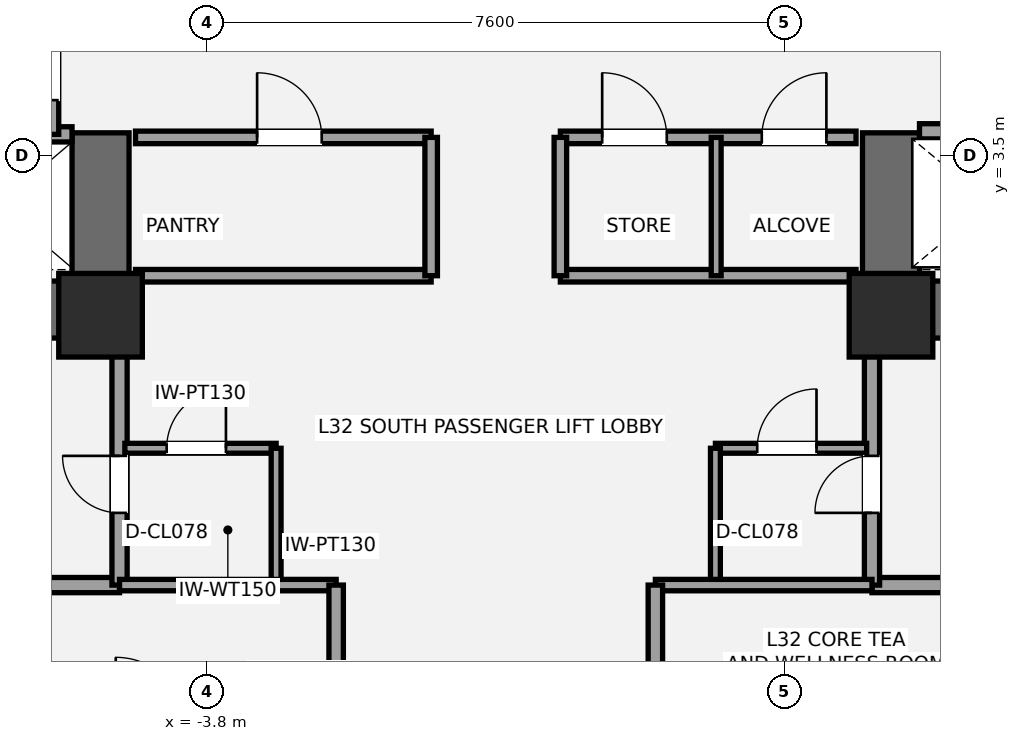
"""IFC4 building model, lengths in metres.
Left out: names, types, materials, properties, quantities, classifications, styles, units other than length and angle.
Written with IfcOpenShell. Run it as: python <this file> out.ifc"""

import sys

from ifc_helpers import new_model, si_unit, direction, frame, frame_2d, origin, origin_2d, place, context, subcontext, project, spatial, rectangle, extrude, element, fill, save


model = new_model("IFC4")
c1 = context("Model", 3, precision=1e-05, world=origin(), true_north=direction((0.0, 1.0)))
c2 = subcontext(c1, "Body", "Model", "MODEL_VIEW")
j1 = project(units=[si_unit("LENGTHUNIT", "METRE"), si_unit("PLANEANGLEUNIT", "RADIAN")], contexts=[c1])
p1 = place(None, origin())
s1 = spatial("IfcSite", under=j1, at=p1, CompositionType="ELEMENT")
p2 = place(p1, origin())
s2 = spatial("IfcBuilding", under=s1, at=p2, CompositionType="ELEMENT")
p3 = place(p2, frame((0.0, 0.0, 121.1)))
s3 = spatial("IfcBuildingStorey", under=s2, at=p3, CompositionType="ELEMENT", Elevation=121.1)
p4 = place(p3, frame((-4.825, 1.475, 0.0), z_axis=(0.0, 0.0, 1.0), x_axis=(-1.0, 0.0, 0.0)))
e1 = element("IfcWall", 1, at=p4, inside=s3, PredefinedType="SHEAR", context=c2, shape_type="SweptSolid", body=[
    extrude(rectangle(XDim=9.075, YDim=0.75, at=frame_2d((4.538, 0.0))), origin(), (0.0, 0.0, 1.0), 3.5),
])
p5 = place(p4, frame((5.475, 0.0, 0.0)))
e2 = element("IfcOpeningElement", 2, at=p5, cuts=e1, PredefinedType="OPENING", context=c2, shape_type="SweptSolid", body=[
    extrude(rectangle(XDim=1.05, YDim=2.15, at=frame_2d((0.525, 1.075))), frame((0.0, 0.385, 0.0), z_axis=(0.0, -1.0, 0.0), x_axis=(1.0, 0.0, 0.0)), (0.0, 0.0, 1.0), 0.77),
])
p6 = place(p4, frame((3.805, 0.0, 0.0)))
e3 = element("IfcOpeningElement", 3, at=p6, cuts=e1, PredefinedType="OPENING", context=c2, shape_type="SweptSolid", body=[
    extrude(rectangle(XDim=1.1, YDim=2.2, at=frame_2d((0.55, 1.1))), frame((0.0, 0.385, 0.0), z_axis=(0.0, -1.0, 0.0), x_axis=(1.0, 0.0, 0.0)), (0.0, 0.0, 1.0), 0.77),
])
p7 = place(p3, frame((-5.2, 1.1, 0.0), z_axis=(0.0, 0.0, 1.0), x_axis=(0.0, 1.0, 0.0)))
e4 = element("IfcWall", 4, at=p7, inside=s3, PredefinedType="SHEAR", context=c2, shape_type="SweptSolid", body=[
    extrude(rectangle(XDim=2.7, YDim=0.75, at=frame_2d((1.35, 0.0))), origin(), (0.0, 0.0, 1.0), 3.5),
])
p8 = place(p3, frame((13.9, 1.475, 0.0), z_axis=(0.0, 0.0, 1.0), x_axis=(-1.0, 0.0, 0.0)))
e5 = element("IfcWall", 5, at=p8, inside=s3, PredefinedType="SHEAR", context=c2, shape_type="SweptSolid", body=[
    extrude(rectangle(XDim=9.075, YDim=0.75, at=frame_2d((4.538, 0.0))), origin(), (0.0, 0.0, 1.0), 3.5),
])
p9 = place(p8, frame((2.55, 0.0, 0.0)))
e6 = element("IfcOpeningElement", 6, at=p9, cuts=e5, PredefinedType="OPENING", context=c2, shape_type="SweptSolid", body=[
    extrude(rectangle(XDim=1.05, YDim=2.15, at=frame_2d((0.525, 1.075))), frame((0.0, 0.385, 0.0), z_axis=(0.0, -1.0, 0.0), x_axis=(1.0, 0.0, 0.0)), (0.0, 0.0, 1.0), 0.77),
])
p10 = place(p8, frame((4.55, 0.0, 0.0)))
e7 = element("IfcOpeningElement", 7, at=p10, cuts=e5, PredefinedType="OPENING", context=c2, shape_type="SweptSolid", body=[
    extrude(rectangle(XDim=1.1, YDim=2.2, at=frame_2d((0.55, 1.1))), frame((0.0, 0.385, 0.0), z_axis=(0.0, -1.0, 0.0), x_axis=(1.0, 0.0, 0.0)), (0.0, 0.0, 1.0), 0.77),
])
p11 = place(p3, frame((5.2, 1.1, 0.0), z_axis=(0.0, 0.0, 1.0), x_axis=(0.0, 1.0, 0.0)))
e8 = element("IfcWall", 8, at=p11, inside=s3, PredefinedType="SHEAR", context=c2, shape_type="SweptSolid", body=[
    extrude(rectangle(XDim=2.7, YDim=0.75, at=frame_2d((1.35, 0.0))), origin(), (0.0, 0.0, 1.0), 3.5),
])
for number, where, z_axis, x_axis in (
    (9, (-5.2, 1.4, 0.0), (0.0, 0.0, 1.0), (1.0, 0.0, 0.0)),
    (10, (5.2, 1.4, 0.0), (0.0, 0.0, 1.0), (1.0, 0.0, 0.0)),
):
    element("IfcColumn", number, at=place(p3, frame(where, z_axis=z_axis, x_axis=x_axis)), inside=s3, PredefinedType="COLUMN", context=c2, shape_type="SweptSolid", body=[
        extrude(rectangle(XDim=1.1, YDim=1.1, at=origin_2d()), origin(), (0.0, 0.0, 1.0), 3.5),
    ])
p12 = place(p3, frame((-7.2, -2.15, 0.0), z_axis=(0.0, 0.0, 1.0), x_axis=(1.0, 0.0, 0.0)))
e11 = element("IfcWall", 11, at=p12, inside=s3, PredefinedType="SOLIDWALL", context=c2, shape_type="SweptSolid", body=[
    extrude(rectangle(XDim=2.25, YDim=0.2, at=frame_2d((1.125, 0.0))), origin(), (0.0, 0.0, 1.0), 2.763),
])
p13 = place(p3, frame((-4.95, -2.15, 0.0), z_axis=(0.0, 0.0, 1.0), x_axis=(0.0, 1.0, 0.0)))
e12 = element("IfcWall", 12, at=p13, inside=s3, PredefinedType="SOLIDWALL", context=c2, shape_type="SweptSolid", body=[
    extrude(rectangle(XDim=3.3, YDim=0.2, at=frame_2d((1.65, 0.0))), origin(), (0.0, 0.0, 1.0), 2.763),
])
p14 = place(p13, frame((0.95, 0.0, 0.0)))
e13 = element("IfcOpeningElement", 13, at=p14, cuts=e12, PredefinedType="OPENING", context=c2, shape_type="SweptSolid", body=[
    extrude(rectangle(XDim=0.75, YDim=2.1, at=frame_2d((0.375, 1.05))), frame((0.0, 0.11, 0.0), z_axis=(0.0, -1.0, 0.0), x_axis=(1.0, 0.0, 0.0)), (0.0, 0.0, 1.0), 0.22),
])
p15 = place(p3, frame((4.95, -2.15, 0.0), z_axis=(0.0, 0.0, 1.0), x_axis=(1.0, 0.0, 0.0)))
e14 = element("IfcWall", 14, at=p15, inside=s3, PredefinedType="SOLIDWALL", context=c2, shape_type="SweptSolid", body=[
    extrude(rectangle(XDim=2.25, YDim=0.2, at=frame_2d((1.125, 0.0))), origin(), (0.0, 0.0, 1.0), 3.31),
])
p16 = place(p3, frame((4.95, -2.15, 0.0), z_axis=(0.0, 0.0, 1.0), x_axis=(0.0, 1.0, 0.0)))
e15 = element("IfcWall", 15, at=p16, inside=s3, PredefinedType="SOLIDWALL", context=c2, shape_type="SweptSolid", body=[
    extrude(rectangle(XDim=3.3, YDim=0.2, at=frame_2d((1.65, 0.0))), origin(), (0.0, 0.0, 1.0), 2.763),
])
p17 = place(p16, frame((0.95, 0.0, 0.0)))
e16 = element("IfcOpeningElement", 16, at=p17, cuts=e15, PredefinedType="OPENING", context=c2, shape_type="SweptSolid", body=[
    extrude(rectangle(XDim=0.75, YDim=2.1, at=frame_2d((0.375, 1.05))), frame((0.0, 0.11, 0.0), z_axis=(0.0, -1.0, 0.0), x_axis=(1.0, 0.0, 0.0)), (0.0, 0.0, 1.0), 0.22),
])
p18 = place(p3, frame((-4.88, -0.35, 0.0), z_axis=(0.0, 0.0, 1.0), x_axis=(1.0, 0.0, 0.0)))
e17 = element("IfcWall", 17, at=p18, inside=s3, PredefinedType="PARTITIONING", context=c2, shape_type="SweptSolid", body=[
    extrude(rectangle(XDim=1.99, YDim=0.13, at=frame_2d((0.995, 0.0))), origin(), (0.0, 0.0, 1.0), 3.31),
])
p19 = place(p18, frame((0.55, 0.0, 0.0)))
e18 = element("IfcOpeningElement", 18, at=p19, cuts=e17, PredefinedType="OPENING", context=c2, shape_type="SweptSolid", body=[
    extrude(rectangle(XDim=0.78, YDim=2.1, at=frame_2d((0.39, 1.05))), frame((0.0, 0.075, 0.0), z_axis=(0.0, -1.0, 0.0), x_axis=(1.0, 0.0, 0.0)), (0.0, 0.0, 1.0), 0.15),
])
p20 = place(p3, frame((-2.89, -2.15, 0.0), z_axis=(0.0, 0.0, 1.0), x_axis=(0.0, 1.0, 0.0)))
e19 = element("IfcWall", 19, at=p20, inside=s3, PredefinedType="PARTITIONING", context=c2, shape_type="SweptSolid", body=[
    extrude(rectangle(XDim=1.8, YDim=0.13, at=frame_2d((0.9, 0.0))), origin(), (0.0, 0.0, 1.0), 2.763),
])
p21 = place(p3, frame((2.89, -0.35, 0.0), z_axis=(0.0, 0.0, 1.0), x_axis=(1.0, 0.0, 0.0)))
e20 = element("IfcWall", 20, at=p21, inside=s3, PredefinedType="PARTITIONING", context=c2, shape_type="SweptSolid", body=[
    extrude(rectangle(XDim=1.99, YDim=0.13, at=frame_2d((0.995, 0.0))), origin(), (0.0, 0.0, 1.0), 3.31),
])
p22 = place(p21, frame((0.55, 0.0, 0.0)))
e21 = element("IfcOpeningElement", 21, at=p22, cuts=e20, PredefinedType="OPENING", context=c2, shape_type="SweptSolid", body=[
    extrude(rectangle(XDim=0.78, YDim=2.1, at=frame_2d((0.39, 1.05))), frame((0.0, 0.075, 0.0), z_axis=(0.0, -1.0, 0.0), x_axis=(1.0, 0.0, 0.0)), (0.0, 0.0, 1.0), 0.15),
])
p23 = place(p3, frame((2.89, -2.15, 0.0), z_axis=(0.0, 0.0, 1.0), x_axis=(0.0, 1.0, 0.0)))
e22 = element("IfcWall", 22, at=p23, inside=s3, PredefinedType="PARTITIONING", context=c2, shape_type="SweptSolid", body=[
    extrude(rectangle(XDim=1.8, YDim=0.13, at=frame_2d((0.9, 0.0))), origin(), (0.0, 0.0, 1.0), 3.31),
])
p24 = place(p3, frame((-9.78, 3.78, 0.0), z_axis=(0.0, 0.0, 1.0), x_axis=(1.0, 0.0, 0.0)))
e23 = element("IfcWall", 23, at=p24, inside=s3, PredefinedType="SOLIDWALL", context=c2, shape_type="SweptSolid", body=[
    extrude(rectangle(XDim=4.205, YDim=0.2, at=frame_2d((2.103, 0.0))), origin(), (0.0, 0.0, 1.0), 3.31),
])
p25 = place(p3, frame((-5.85, 3.78, 0.0), z_axis=(0.0, 0.0, 1.0), x_axis=(0.0, 1.0, 0.0)))
e24 = element("IfcWall", 24, at=p25, inside=s3, PredefinedType="SOLIDWALL", context=c2, shape_type="SweptSolid", body=[
    extrude(rectangle(XDim=1.69, YDim=0.2, at=frame_2d((0.845, 0.0))), origin(), (0.0, 0.0, 1.0), 3.31),
])
p26 = place(p25, frame((0.45, 0.0, 0.0)))
e25 = element("IfcOpeningElement", 25, at=p26, cuts=e24, PredefinedType="OPENING", context=c2, shape_type="SweptSolid", body=[
    extrude(rectangle(XDim=0.75, YDim=2.1, at=frame_2d((0.375, 1.05))), frame((0.0, 0.11, 0.0), z_axis=(0.0, -1.0, 0.0), x_axis=(1.0, 0.0, 0.0)), (0.0, 0.0, 1.0), 0.22),
])
p27 = place(p3, frame((5.575, 3.82, 0.0), z_axis=(0.0, 0.0, 1.0), x_axis=(1.0, 0.0, 0.0)))
e26 = element("IfcWall", 26, at=p27, inside=s3, PredefinedType="SOLIDWALL", context=c2, shape_type="SweptSolid", body=[
    extrude(rectangle(XDim=4.205, YDim=0.2, at=frame_2d((2.103, 0.0))), origin(), (0.0, 0.0, 1.0), 3.31),
])
p28 = place(p27, frame((0.65, 0.0, 0.0)))
e27 = element("IfcOpeningElement", 27, at=p28, cuts=e26, PredefinedType="OPENING", context=c2, shape_type="SweptSolid", body=[
    extrude(rectangle(XDim=1.2, YDim=2.2, at=frame_2d((0.6, 1.1))), frame((0.0, 0.11, 0.0), z_axis=(0.0, -1.0, 0.0), x_axis=(1.0, 0.0, 0.0)), (0.0, 0.0, 1.0), 0.22),
])
p29 = place(p3, frame((-4.74, 1.92, 0.0), z_axis=(0.0, 0.0, 1.0), x_axis=(1.0, 0.0, 0.0)))
e28 = element("IfcWall", 28, at=p29, inside=s3, PredefinedType="PARTITIONING", context=c2, shape_type="SweptSolid", body=[
    extrude(rectangle(XDim=3.89, YDim=0.165, at=frame_2d((1.945, 0.0))), origin(), (0.0, 0.0, 1.0), 2.3),
])
p30 = place(p3, frame((-4.74, 3.74, 0.0), z_axis=(0.0, 0.0, 1.0), x_axis=(1.0, 0.0, 0.0)))
e29 = element("IfcWall", 29, at=p30, inside=s3, PredefinedType="PARTITIONING", context=c2, shape_type="SweptSolid", body=[
    extrude(rectangle(XDim=3.89, YDim=0.165, at=frame_2d((1.945, 0.0))), origin(), (0.0, 0.0, 1.0), 3.31),
])
p31 = place(p30, frame((1.6, 0.0, 0.0)))
e30 = element("IfcOpeningElement", 30, at=p31, cuts=e29, PredefinedType="OPENING", context=c2, shape_type="SweptSolid", body=[
    extrude(rectangle(XDim=0.85, YDim=2.1, at=frame_2d((0.425, 1.05))), frame((0.0, 0.093, 0.0), z_axis=(0.0, -1.0, 0.0), x_axis=(1.0, 0.0, 0.0)), (0.0, 0.0, 1.0), 0.185),
])
p32 = place(p3, frame((-0.85, 1.92, 0.0), z_axis=(0.0, 0.0, 1.0), x_axis=(0.0, 1.0, 0.0)))
e31 = element("IfcWall", 31, at=p32, inside=s3, PredefinedType="PARTITIONING", context=c2, shape_type="SweptSolid", body=[
    extrude(rectangle(XDim=1.82, YDim=0.165, at=frame_2d((0.91, 0.0))), origin(), (0.0, 0.0, 1.0), 3.31),
])
p33 = place(p3, frame((0.85, 1.92, 0.0), z_axis=(0.0, 0.0, 1.0), x_axis=(1.0, 0.0, 0.0)))
e32 = element("IfcWall", 32, at=p33, inside=s3, PredefinedType="PARTITIONING", context=c2, shape_type="SweptSolid", body=[
    extrude(rectangle(XDim=3.89, YDim=0.165, at=frame_2d((1.945, 0.0))), origin(), (0.0, 0.0, 1.0), 2.3),
])
p34 = place(p3, frame((0.85, 3.74, 0.0), z_axis=(0.0, 0.0, 1.0), x_axis=(1.0, 0.0, 0.0)))
e33 = element("IfcWall", 33, at=p34, inside=s3, PredefinedType="PARTITIONING", context=c2, shape_type="SweptSolid", body=[
    extrude(rectangle(XDim=3.89, YDim=0.165, at=frame_2d((1.945, 0.0))), origin(), (0.0, 0.0, 1.0), 3.31),
])
p35 = place(p34, frame((0.55, 0.0, 0.0)))
e34 = element("IfcOpeningElement", 34, at=p35, cuts=e33, PredefinedType="OPENING", context=c2, shape_type="SweptSolid", body=[
    extrude(rectangle(XDim=0.85, YDim=2.1, at=frame_2d((0.425, 1.05))), frame((0.0, 0.093, 0.0), z_axis=(0.0, -1.0, 0.0), x_axis=(1.0, 0.0, 0.0)), (0.0, 0.0, 1.0), 0.185),
])
p36 = place(p34, frame((2.65, 0.0, 0.0)))
e35 = element("IfcOpeningElement", 35, at=p36, cuts=e33, PredefinedType="OPENING", context=c2, shape_type="SweptSolid", body=[
    extrude(rectangle(XDim=0.85, YDim=2.1, at=frame_2d((0.425, 1.05))), frame((0.0, 0.093, 0.0), z_axis=(0.0, -1.0, 0.0), x_axis=(1.0, 0.0, 0.0)), (0.0, 0.0, 1.0), 0.185),
])
p37 = place(p3, frame((0.85, 1.92, 0.0), z_axis=(0.0, 0.0, 1.0), x_axis=(0.0, 1.0, 0.0)))
e36 = element("IfcWall", 36, at=p37, inside=s3, PredefinedType="PARTITIONING", context=c2, shape_type="SweptSolid", body=[
    extrude(rectangle(XDim=1.82, YDim=0.165, at=frame_2d((0.91, 0.0))), origin(), (0.0, 0.0, 1.0), 3.31),
])
p38 = place(p3, frame((2.9, 1.92, 0.0), z_axis=(0.0, 0.0, 1.0), x_axis=(0.0, 1.0, 0.0)))
e37 = element("IfcWall", 37, at=p38, inside=s3, PredefinedType="PARTITIONING", context=c2, shape_type="SweptSolid", body=[
    extrude(rectangle(XDim=1.82, YDim=0.13, at=frame_2d((0.91, 0.0))), origin(), (0.0, 0.0, 1.0), 3.31),
])
p39 = place(p3, frame((-4.95, -2.15, 0.0), z_axis=(0.0, 0.0, 1.0), x_axis=(1.0, 0.0, 0.0)))
e38 = element("IfcWall", 38, at=p39, inside=s3, PredefinedType="PLUMBINGWALL", context=c2, shape_type="SweptSolid", body=[
    extrude(rectangle(XDim=2.85, YDim=0.15, at=frame_2d((1.425, 0.0))), origin(), (0.0, 0.0, 1.0), 2.763),
])
p40 = place(p3, frame((-2.1, -4.05, 0.0), z_axis=(0.0, 0.0, 1.0), x_axis=(0.0, 1.0, 0.0)))
e39 = element("IfcWall", 39, at=p40, inside=s3, PredefinedType="PLUMBINGWALL", context=c2, shape_type="SweptSolid", body=[
    extrude(rectangle(XDim=1.9, YDim=0.19, at=frame_2d((0.95, 0.0))), origin(), (0.0, 0.0, 1.0), 2.763),
])
p41 = place(p3, frame((2.1, -2.15, 0.0), z_axis=(0.0, 0.0, 1.0), x_axis=(1.0, 0.0, 0.0)))
e40 = element("IfcWall", 40, at=p41, inside=s3, PredefinedType="PLUMBINGWALL", context=c2, shape_type="SweptSolid", body=[
    extrude(rectangle(XDim=2.85, YDim=0.15, at=frame_2d((1.425, 0.0))), origin(), (0.0, 0.0, 1.0), 3.31),
])
p42 = place(p3, frame((2.1, -4.05, 0.0), z_axis=(0.0, 0.0, 1.0), x_axis=(0.0, 1.0, 0.0)))
e41 = element("IfcWall", 41, at=p42, inside=s3, PredefinedType="PLUMBINGWALL", context=c2, shape_type="SweptSolid", body=[
    extrude(rectangle(XDim=1.9, YDim=0.19, at=frame_2d((0.95, 0.0))), origin(), (0.0, 0.0, 1.0), 3.31),
])
p43 = place(p14, origin())
e42 = element("IfcDoor", 42, at=p43, inside=s3, OperationType="SINGLE_SWING_RIGHT", PredefinedType="DOOR", context=c2, shape_type="SweptSolid", body=[
    extrude(rectangle(XDim=0.75, YDim=2.1, at=frame_2d((0.375, 1.05))), frame((0.0, 0.025, 0.0), z_axis=(0.0, -1.0, 0.0), x_axis=(1.0, 0.0, 0.0)), (0.0, 0.0, 1.0), 0.05),
])
fill(e13, e42)
p44 = place(p17, origin())
e43 = element("IfcDoor", 43, at=p44, inside=s3, OperationType="SINGLE_SWING_LEFT", PredefinedType="DOOR", context=c2, shape_type="SweptSolid", body=[
    extrude(rectangle(XDim=0.75, YDim=2.1, at=frame_2d((0.375, 1.05))), frame((0.0, 0.025, 0.0), z_axis=(0.0, -1.0, 0.0), x_axis=(1.0, 0.0, 0.0)), (0.0, 0.0, 1.0), 0.05),
])
fill(e16, e43)
p45 = place(p19, origin())
e44 = element("IfcDoor", 44, at=p45, inside=s3, OperationType="SINGLE_SWING_RIGHT", PredefinedType="DOOR", context=c2, shape_type="SweptSolid", body=[
    extrude(rectangle(XDim=0.78, YDim=2.1, at=frame_2d((0.39, 1.05))), frame((0.0, 0.025, 0.0), z_axis=(0.0, -1.0, 0.0), x_axis=(1.0, 0.0, 0.0)), (0.0, 0.0, 1.0), 0.05),
])
fill(e18, e44)
p46 = place(p22, origin())
e45 = element("IfcDoor", 45, at=p46, inside=s3, OperationType="SINGLE_SWING_RIGHT", PredefinedType="DOOR", context=c2, shape_type="SweptSolid", body=[
    extrude(rectangle(XDim=0.78, YDim=2.1, at=frame_2d((0.39, 1.05))), frame((0.0, 0.025, 0.0), z_axis=(0.0, -1.0, 0.0), x_axis=(1.0, 0.0, 0.0)), (0.0, 0.0, 1.0), 0.05),
])
fill(e21, e45)
p47 = place(p26, origin())
e46 = element("IfcDoor", 46, at=p47, inside=s3, OperationType="SINGLE_SWING_RIGHT", PredefinedType="DOOR", context=c2, shape_type="SweptSolid", body=[
    extrude(rectangle(XDim=0.75, YDim=2.1, at=frame_2d((0.375, 1.05))), frame((0.0, 0.025, 0.0), z_axis=(0.0, -1.0, 0.0), x_axis=(1.0, 0.0, 0.0)), (0.0, 0.0, 1.0), 0.05),
])
fill(e25, e46)
p48 = place(p31, origin())
e47 = element("IfcDoor", 47, at=p48, inside=s3, OperationType="SINGLE_SWING_LEFT", PredefinedType="DOOR", context=c2, shape_type="SweptSolid", body=[
    extrude(rectangle(XDim=0.85, YDim=2.1, at=frame_2d((0.425, 1.05))), frame((0.0, 0.025, 0.0), z_axis=(0.0, -1.0, 0.0), x_axis=(1.0, 0.0, 0.0)), (0.0, 0.0, 1.0), 0.05),
])
fill(e30, e47)
p49 = place(p35, origin())
e48 = element("IfcDoor", 48, at=p49, inside=s3, OperationType="SINGLE_SWING_LEFT", PredefinedType="DOOR", context=c2, shape_type="SweptSolid", body=[
    extrude(rectangle(XDim=0.85, YDim=2.1, at=frame_2d((0.425, 1.05))), frame((0.0, 0.025, 0.0), z_axis=(0.0, -1.0, 0.0), x_axis=(1.0, 0.0, 0.0)), (0.0, 0.0, 1.0), 0.05),
])
fill(e34, e48)
p50 = place(p36, origin())
e49 = element("IfcDoor", 49, at=p50, inside=s3, OperationType="SINGLE_SWING_RIGHT", PredefinedType="DOOR", context=c2, shape_type="SweptSolid", body=[
    extrude(rectangle(XDim=0.85, YDim=2.1, at=frame_2d((0.425, 1.05))), frame((0.0, 0.025, 0.0), z_axis=(0.0, -1.0, 0.0), x_axis=(1.0, 0.0, 0.0)), (0.0, 0.0, 1.0), 0.05),
])
fill(e35, e49)
save(model, sys.argv[1])
